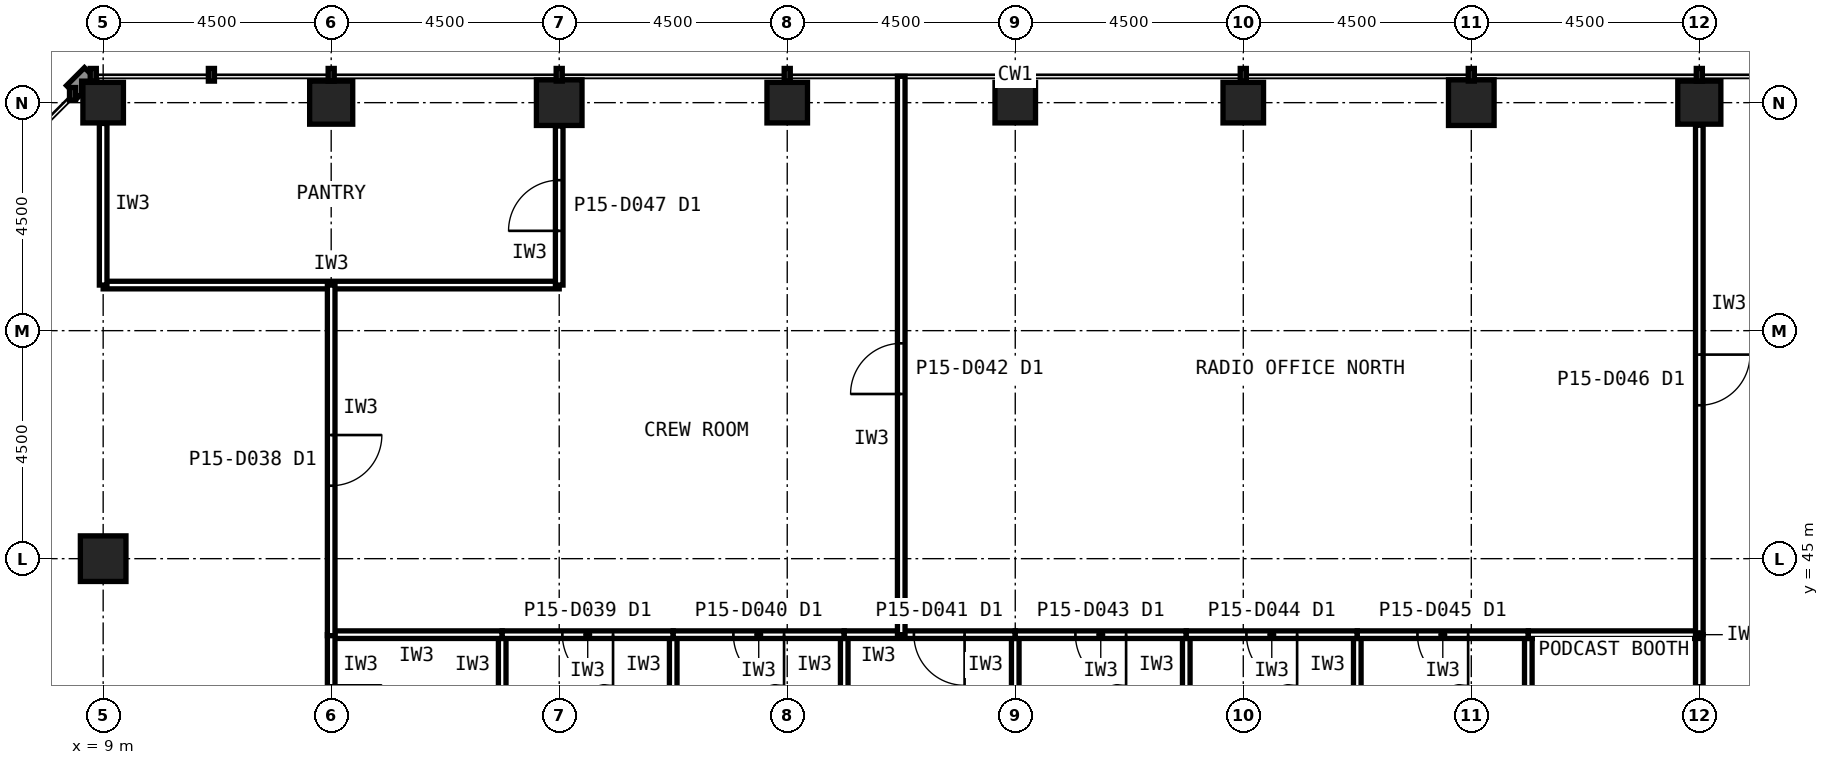
"""IFC4 building model, lengths in metres.
Left out: names, types, materials, properties, quantities, classifications, styles, units other than length and angle.
Written with IfcOpenShell. Run it as: python <this file> out.ifc"""

import sys

from ifc_helpers import new_model, si_unit, direction, frame, frame_2d, origin, origin_2d, place, context, subcontext, project, spatial, rectangle, hollow_rectangle, extrude, element, fill, save


model = new_model("IFC4")
c1 = context("Model", 3, precision=1e-05, world=origin(), true_north=direction((0.0, 1.0)))
c2 = subcontext(c1, "Body", "Model", "MODEL_VIEW")
j1 = project(units=[si_unit("LENGTHUNIT", "METRE"), si_unit("PLANEANGLEUNIT", "RADIAN")], contexts=[c1])
p1 = place(None, origin())
s1 = spatial("IfcSite", under=j1, at=p1, CompositionType="ELEMENT")
p2 = place(p1, origin())
s2 = spatial("IfcBuilding", under=s1, at=p2, CompositionType="ELEMENT")
p3 = place(p2, frame((0.0, 0.0, 62.6)))
s3 = spatial("IfcBuildingStorey", under=s2, at=p3, CompositionType="ELEMENT", Elevation=62.6)
p4 = place(p3, frame((40.5, 54.0, 0.0), z_axis=(0.0, 0.0, 1.0), x_axis=(1.0, 0.0, 0.0)))
e1 = element("IfcColumn", 1, at=p4, inside=s3, PredefinedType="COLUMN", context=c2, shape_type="SweptSolid", body=[
    extrude(hollow_rectangle(XDim=0.85, YDim=0.85, WallThickness=0.05, at=origin_2d()), origin(), (0.0, 0.0, 1.0), 4.2),
])
p5 = place(p3, frame((36.0, 54.0, 0.0), z_axis=(0.0, 0.0, 1.0), x_axis=(1.0, 0.0, 0.0)))
e2 = element("IfcColumn", 2, at=p5, inside=s3, PredefinedType="COLUMN", context=c2, shape_type="SweptSolid", body=[
    extrude(hollow_rectangle(XDim=0.9, YDim=0.9, WallThickness=0.063, at=origin_2d()), origin(), (0.0, 0.0, 1.0), 4.2),
])
for number, where, z_axis, x_axis in (
    (3, (31.5, 54.0, 0.0), (0.0, 0.0, 1.0), (1.0, 0.0, 0.0)),
    (4, (27.0, 54.0, 0.0), (0.0, 0.0, 1.0), (1.0, 0.0, 0.0)),
    (5, (22.5, 54.0, 0.0), (0.0, 0.0, 1.0), (1.0, 0.0, 0.0)),
):
    element("IfcColumn", number, at=place(p3, frame(where, z_axis=z_axis, x_axis=x_axis)), inside=s3, PredefinedType="COLUMN", context=c2, shape_type="SweptSolid", body=[
        extrude(hollow_rectangle(XDim=0.8, YDim=0.8, WallThickness=0.045, at=origin_2d()), origin(), (0.0, 0.0, 1.0), 4.2),
    ])
p6 = place(p3, frame((18.0, 54.0, 0.0), z_axis=(0.0, 0.0, 1.0), x_axis=(1.0, 0.0, 0.0)))
e6 = element("IfcColumn", 6, at=p6, inside=s3, PredefinedType="COLUMN", context=c2, shape_type="SweptSolid", body=[
    extrude(hollow_rectangle(XDim=0.9, YDim=0.9, WallThickness=0.063, at=origin_2d()), origin(), (0.0, 0.0, 1.0), 4.2),
])
p7 = place(p3, frame((13.5, 54.0, 0.0), z_axis=(0.0, 0.0, 1.0), x_axis=(1.0, 0.0, 0.0)))
e7 = element("IfcColumn", 7, at=p7, inside=s3, PredefinedType="COLUMN", context=c2, shape_type="SweptSolid", body=[
    extrude(hollow_rectangle(XDim=0.85, YDim=0.85, WallThickness=0.05, at=origin_2d()), origin(), (0.0, 0.0, 1.0), 4.2),
])
p8 = place(p3, frame((9.0, 54.0, 0.0), z_axis=(0.0, 0.0, 1.0), x_axis=(1.0, 0.0, 0.0)))
e8 = element("IfcColumn", 8, at=p8, inside=s3, PredefinedType="COLUMN", context=c2, shape_type="SweptSolid", body=[
    extrude(hollow_rectangle(XDim=0.8, YDim=0.8, WallThickness=0.045, at=origin_2d()), origin(), (0.0, 0.0, 1.0), 4.2),
])
p9 = place(p3, frame((9.0, 45.0, 0.0), z_axis=(0.0, 0.0, 1.0), x_axis=(1.0, 0.0, 0.0)))
e9 = element("IfcColumn", 9, at=p9, inside=s3, PredefinedType="COLUMN", context=c2, shape_type="SweptSolid", body=[
    extrude(hollow_rectangle(XDim=0.9, YDim=0.9, WallThickness=0.063, at=origin_2d()), origin(), (0.0, 0.0, 1.0), 4.2),
])
p10 = place(p3, frame((16.875, 40.5, 0.0), z_axis=(0.0, 0.0, 1.0), x_axis=(0.0, 1.0, 0.0)))
e10 = element("IfcWall", 10, at=p10, inside=s3, PredefinedType="PARTITIONING", context=c2, shape_type="SweptSolid", body=[
    extrude(rectangle(XDim=3.0, YDim=0.15, at=frame_2d((1.5, 0.0))), origin(), (0.0, 0.0, 1.0), 4.04),
])
p11 = place(p3, frame((16.875, 43.5, 0.0), z_axis=(0.0, 0.0, 1.0), x_axis=(-1.0, 0.0, 0.0)))
e11 = element("IfcWall", 11, at=p11, inside=s3, PredefinedType="PARTITIONING", context=c2, shape_type="SweptSolid", body=[
    extrude(rectangle(XDim=3.375, YDim=0.15, at=frame_2d((1.688, 0.0))), origin(), (0.0, 0.0, 1.0), 4.04),
])
p12 = place(p3, frame((13.5, 43.5, 0.0), z_axis=(0.0, 0.0, 1.0), x_axis=(0.0, -1.0, 0.0)))
e12 = element("IfcWall", 12, at=p12, inside=s3, PredefinedType="PARTITIONING", context=c2, shape_type="SweptSolid", body=[
    extrude(rectangle(XDim=3.0, YDim=0.15, at=frame_2d((1.5, 0.0))), origin(), (0.0, 0.0, 1.0), 3.189),
])
p13 = place(p12, frame((1.0, 0.0, 0.0)))
e13 = element("IfcOpeningElement", 13, at=p13, cuts=e12, PredefinedType="OPENING", context=c2, shape_type="SweptSolid", body=[
    extrude(rectangle(XDim=1.0, YDim=2.1, at=frame_2d((0.5, 1.05))), frame((0.0, 0.085, 0.0), z_axis=(0.0, -1.0, 0.0), x_axis=(1.0, 0.0, 0.0)), (0.0, 0.0, 1.0), 0.17),
])
p14 = place(p3, frame((20.25, 40.5, 0.0), z_axis=(0.0, 0.0, 1.0), x_axis=(0.0, 1.0, 0.0)))
e14 = element("IfcWall", 14, at=p14, inside=s3, PredefinedType="PARTITIONING", context=c2, shape_type="SweptSolid", body=[
    extrude(rectangle(XDim=3.0, YDim=0.15, at=frame_2d((1.5, 0.0))), origin(), (0.0, 0.0, 1.0), 4.04),
])
p15 = place(p3, frame((20.25, 43.5, 0.0), z_axis=(0.0, 0.0, 1.0), x_axis=(-1.0, 0.0, 0.0)))
e15 = element("IfcWall", 15, at=p15, inside=s3, PredefinedType="PARTITIONING", context=c2, shape_type="SweptSolid", body=[
    extrude(rectangle(XDim=3.375, YDim=0.15, at=frame_2d((1.688, 0.0))), origin(), (0.0, 0.0, 1.0), 4.04),
])
p16 = place(p15, frame((1.188, 0.0, 0.0)))
e16 = element("IfcOpeningElement", 16, at=p16, cuts=e15, PredefinedType="OPENING", context=c2, shape_type="SweptSolid", body=[
    extrude(rectangle(XDim=1.0, YDim=2.1, at=frame_2d((0.5, 1.05))), frame((0.0, 0.085, 0.0), z_axis=(0.0, -1.0, 0.0), x_axis=(1.0, 0.0, 0.0)), (0.0, 0.0, 1.0), 0.17),
])
p17 = place(p3, frame((23.625, 40.5, 0.0), z_axis=(0.0, 0.0, 1.0), x_axis=(0.0, 1.0, 0.0)))
e17 = element("IfcWall", 17, at=p17, inside=s3, PredefinedType="PARTITIONING", context=c2, shape_type="SweptSolid", body=[
    extrude(rectangle(XDim=3.0, YDim=0.15, at=frame_2d((1.5, 0.0))), origin(), (0.0, 0.0, 1.0), 4.04),
])
p18 = place(p3, frame((23.625, 43.5, 0.0), z_axis=(0.0, 0.0, 1.0), x_axis=(-1.0, 0.0, 0.0)))
e18 = element("IfcWall", 18, at=p18, inside=s3, PredefinedType="PARTITIONING", context=c2, shape_type="SweptSolid", body=[
    extrude(rectangle(XDim=3.375, YDim=0.15, at=frame_2d((1.688, 0.0))), origin(), (0.0, 0.0, 1.0), 4.04),
])
p19 = place(p18, frame((1.188, 0.0, 0.0)))
e19 = element("IfcOpeningElement", 19, at=p19, cuts=e18, PredefinedType="OPENING", context=c2, shape_type="SweptSolid", body=[
    extrude(rectangle(XDim=1.0, YDim=2.1, at=frame_2d((0.5, 1.05))), frame((0.0, 0.085, 0.0), z_axis=(0.0, -1.0, 0.0), x_axis=(1.0, 0.0, 0.0)), (0.0, 0.0, 1.0), 0.17),
])
p20 = place(p3, frame((27.0, 40.5, 0.0), z_axis=(0.0, 0.0, 1.0), x_axis=(0.0, 1.0, 0.0)))
e20 = element("IfcWall", 20, at=p20, inside=s3, PredefinedType="PARTITIONING", context=c2, shape_type="SweptSolid", body=[
    extrude(rectangle(XDim=3.0, YDim=0.15, at=frame_2d((1.5, 0.0))), origin(), (0.0, 0.0, 1.0), 3.189),
])
p21 = place(p3, frame((27.0, 43.5, 0.0), z_axis=(0.0, 0.0, 1.0), x_axis=(-1.0, 0.0, 0.0)))
e21 = element("IfcWall", 21, at=p21, inside=s3, PredefinedType="PARTITIONING", context=c2, shape_type="SweptSolid", body=[
    extrude(rectangle(XDim=3.375, YDim=0.15, at=frame_2d((1.688, 0.0))), origin(), (0.0, 0.0, 1.0), 4.04),
])
p22 = place(p21, frame((1.0, 0.0, 0.0)))
e22 = element("IfcOpeningElement", 22, at=p22, cuts=e21, PredefinedType="OPENING", context=c2, shape_type="SweptSolid", body=[
    extrude(rectangle(XDim=1.0, YDim=2.1, at=frame_2d((0.5, 1.05))), frame((0.0, 0.085, 0.0), z_axis=(0.0, -1.0, 0.0), x_axis=(1.0, 0.0, 0.0)), (0.0, 0.0, 1.0), 0.17),
])
p23 = place(p3, frame((30.375, 40.5, 0.0), z_axis=(0.0, 0.0, 1.0), x_axis=(0.0, 1.0, 0.0)))
e23 = element("IfcWall", 23, at=p23, inside=s3, PredefinedType="PARTITIONING", context=c2, shape_type="SweptSolid", body=[
    extrude(rectangle(XDim=3.0, YDim=0.15, at=frame_2d((1.5, 0.0))), origin(), (0.0, 0.0, 1.0), 4.04),
])
p24 = place(p3, frame((30.375, 43.5, 0.0), z_axis=(0.0, 0.0, 1.0), x_axis=(-1.0, 0.0, 0.0)))
e24 = element("IfcWall", 24, at=p24, inside=s3, PredefinedType="PARTITIONING", context=c2, shape_type="SweptSolid", body=[
    extrude(rectangle(XDim=3.375, YDim=0.15, at=frame_2d((1.688, 0.0))), origin(), (0.0, 0.0, 1.0), 4.04),
])
p25 = place(p24, frame((1.188, 0.0, 0.0)))
e25 = element("IfcOpeningElement", 25, at=p25, cuts=e24, PredefinedType="OPENING", context=c2, shape_type="SweptSolid", body=[
    extrude(rectangle(XDim=1.0, YDim=2.1, at=frame_2d((0.5, 1.05))), frame((0.0, 0.085, 0.0), z_axis=(0.0, -1.0, 0.0), x_axis=(1.0, 0.0, 0.0)), (0.0, 0.0, 1.0), 0.17),
])
p26 = place(p3, frame((33.75, 40.5, 0.0), z_axis=(0.0, 0.0, 1.0), x_axis=(0.0, 1.0, 0.0)))
e26 = element("IfcWall", 26, at=p26, inside=s3, PredefinedType="PARTITIONING", context=c2, shape_type="SweptSolid", body=[
    extrude(rectangle(XDim=3.0, YDim=0.15, at=frame_2d((1.5, 0.0))), origin(), (0.0, 0.0, 1.0), 4.04),
])
p27 = place(p3, frame((33.75, 43.5, 0.0), z_axis=(0.0, 0.0, 1.0), x_axis=(-1.0, 0.0, 0.0)))
e27 = element("IfcWall", 27, at=p27, inside=s3, PredefinedType="PARTITIONING", context=c2, shape_type="SweptSolid", body=[
    extrude(rectangle(XDim=3.375, YDim=0.15, at=frame_2d((1.688, 0.0))), origin(), (0.0, 0.0, 1.0), 4.04),
])
p28 = place(p27, frame((1.188, 0.0, 0.0)))
e28 = element("IfcOpeningElement", 28, at=p28, cuts=e27, PredefinedType="OPENING", context=c2, shape_type="SweptSolid", body=[
    extrude(rectangle(XDim=1.0, YDim=2.1, at=frame_2d((0.5, 1.05))), frame((0.0, 0.085, 0.0), z_axis=(0.0, -1.0, 0.0), x_axis=(1.0, 0.0, 0.0)), (0.0, 0.0, 1.0), 0.17),
])
p29 = place(p3, frame((37.125, 40.5, 0.0), z_axis=(0.0, 0.0, 1.0), x_axis=(0.0, 1.0, 0.0)))
e29 = element("IfcWall", 29, at=p29, inside=s3, PredefinedType="PARTITIONING", context=c2, shape_type="SweptSolid", body=[
    extrude(rectangle(XDim=3.0, YDim=0.15, at=frame_2d((1.5, 0.0))), origin(), (0.0, 0.0, 1.0), 4.04),
])
p30 = place(p3, frame((37.125, 43.5, 0.0), z_axis=(0.0, 0.0, 1.0), x_axis=(-1.0, 0.0, 0.0)))
e30 = element("IfcWall", 30, at=p30, inside=s3, PredefinedType="PARTITIONING", context=c2, shape_type="SweptSolid", body=[
    extrude(rectangle(XDim=3.375, YDim=0.15, at=frame_2d((1.688, 0.0))), origin(), (0.0, 0.0, 1.0), 4.04),
])
p31 = place(p30, frame((1.188, 0.0, 0.0)))
e31 = element("IfcOpeningElement", 31, at=p31, cuts=e30, PredefinedType="OPENING", context=c2, shape_type="SweptSolid", body=[
    extrude(rectangle(XDim=1.0, YDim=2.1, at=frame_2d((0.5, 1.05))), frame((0.0, 0.085, 0.0), z_axis=(0.0, -1.0, 0.0), x_axis=(1.0, 0.0, 0.0)), (0.0, 0.0, 1.0), 0.17),
])
p32 = place(p3, frame((40.5, 40.5, 0.0), z_axis=(0.0, 0.0, 1.0), x_axis=(0.0, 1.0, 0.0)))
e32 = element("IfcWall", 32, at=p32, inside=s3, PredefinedType="PARTITIONING", context=c2, shape_type="SweptSolid", body=[
    extrude(rectangle(XDim=3.0, YDim=0.15, at=frame_2d((1.5, 0.0))), origin(), (0.0, 0.0, 1.0), 3.189),
])
p33 = place(p32, frame((1.0, 0.0, 0.0)))
e33 = element("IfcOpeningElement", 33, at=p33, cuts=e32, PredefinedType="OPENING", context=c2, shape_type="SweptSolid", body=[
    extrude(rectangle(XDim=1.0, YDim=2.1, at=frame_2d((0.5, 1.05))), frame((0.0, 0.085, 0.0), z_axis=(0.0, -1.0, 0.0), x_axis=(1.0, 0.0, 0.0)), (0.0, 0.0, 1.0), 0.17),
])
p34 = place(p3, frame((40.5, 43.5, 0.0), z_axis=(0.0, 0.0, 1.0), x_axis=(-1.0, 0.0, 0.0)))
e34 = element("IfcWall", 34, at=p34, inside=s3, PredefinedType="PARTITIONING", context=c2, shape_type="SweptSolid", body=[
    extrude(rectangle(XDim=3.375, YDim=0.15, at=frame_2d((1.688, 0.0))), origin(), (0.0, 0.0, 1.0), 4.04),
])
p35 = place(p3, frame((9.0, 50.4, 0.0), z_axis=(0.0, 0.0, 1.0), x_axis=(1.0, 0.0, 0.0)))
e35 = element("IfcWall", 35, at=p35, inside=s3, PredefinedType="PARTITIONING", context=c2, shape_type="SweptSolid", body=[
    extrude(rectangle(XDim=9.0, YDim=0.15, at=frame_2d((4.5, 0.0))), origin(), (0.0, 0.0, 1.0), 4.04),
])
p36 = place(p3, frame((18.0, 50.4, 0.0), z_axis=(0.0, 0.0, 1.0), x_axis=(0.0, 1.0, 0.0)))
e36 = element("IfcWall", 36, at=p36, inside=s3, PredefinedType="PARTITIONING", context=c2, shape_type="SweptSolid", body=[
    extrude(rectangle(XDim=3.14, YDim=0.15, at=frame_2d((1.57, 0.0))), origin(), (0.0, 0.0, 1.0), 3.189),
])
p37 = place(p36, frame((1.07, 0.0, 0.0)))
e37 = element("IfcOpeningElement", 37, at=p37, cuts=e36, PredefinedType="OPENING", context=c2, shape_type="SweptSolid", body=[
    extrude(rectangle(XDim=1.0, YDim=2.1, at=frame_2d((0.5, 1.05))), frame((0.0, 0.085, 0.0), z_axis=(0.0, -1.0, 0.0), x_axis=(1.0, 0.0, 0.0)), (0.0, 0.0, 1.0), 0.17),
])
p38 = place(p3, frame((9.0, 53.59, 0.0), z_axis=(0.0, 0.0, 1.0), x_axis=(0.0, -1.0, 0.0)))
e38 = element("IfcWall", 38, at=p38, inside=s3, PredefinedType="PARTITIONING", context=c2, shape_type="SweptSolid", body=[
    extrude(rectangle(XDim=3.19, YDim=0.15, at=frame_2d((1.595, 0.0))), origin(), (0.0, 0.0, 1.0), 3.429),
])
p39 = place(p3, frame((40.5, 53.555, 0.0), z_axis=(0.0, 0.0, 1.0), x_axis=(0.0, -1.0, 0.0)))
e39 = element("IfcWall", 39, at=p39, inside=s3, PredefinedType="PARTITIONING", context=c2, shape_type="SweptSolid", body=[
    extrude(rectangle(XDim=10.055, YDim=0.15, at=frame_2d((5.027, 0.0))), origin(), (0.0, 0.0, 1.0), 3.189),
])
p40 = place(p39, frame((4.528, 0.0, 0.0)))
e40 = element("IfcOpeningElement", 40, at=p40, cuts=e39, PredefinedType="OPENING", context=c2, shape_type="SweptSolid", body=[
    extrude(rectangle(XDim=1.0, YDim=2.1, at=frame_2d((0.5, 1.05))), frame((0.0, 0.085, 0.0), z_axis=(0.0, -1.0, 0.0), x_axis=(1.0, 0.0, 0.0)), (0.0, 0.0, 1.0), 0.17),
])
p41 = place(p3, frame((24.75, 43.5, 0.0), z_axis=(0.0, 0.0, 1.0), x_axis=(0.0, 1.0, 0.0)))
e41 = element("IfcWall", 41, at=p41, inside=s3, PredefinedType="PARTITIONING", context=c2, shape_type="SweptSolid", body=[
    extrude(rectangle(XDim=11.02, YDim=0.15, at=frame_2d((5.51, 0.0))), origin(), (0.0, 0.0, 1.0), 4.04),
])
p42 = place(p41, frame((4.75, 0.0, 0.0)))
e42 = element("IfcOpeningElement", 42, at=p42, cuts=e41, PredefinedType="OPENING", context=c2, shape_type="SweptSolid", body=[
    extrude(rectangle(XDim=1.0, YDim=2.1, at=frame_2d((0.5, 1.05))), frame((0.0, 0.085, 0.0), z_axis=(0.0, -1.0, 0.0), x_axis=(1.0, 0.0, 0.0)), (0.0, 0.0, 1.0), 0.17),
])
p43 = place(p3, frame((13.5, 50.4, 0.0), z_axis=(0.0, 0.0, 1.0), x_axis=(0.0, -1.0, 0.0)))
e43 = element("IfcWall", 43, at=p43, inside=s3, PredefinedType="PARTITIONING", context=c2, shape_type="SweptSolid", body=[
    extrude(rectangle(XDim=6.92, YDim=0.15, at=frame_2d((3.46, 0.0))), origin(), (0.0, 0.0, 1.0), 3.189),
])
p44 = place(p43, frame((2.96, 0.0, 0.0)))
e44 = element("IfcOpeningElement", 44, at=p44, cuts=e43, PredefinedType="OPENING", context=c2, shape_type="SweptSolid", body=[
    extrude(rectangle(XDim=1.0, YDim=2.1, at=frame_2d((0.5, 1.05))), frame((0.0, 0.085, 0.0), z_axis=(0.0, -1.0, 0.0), x_axis=(1.0, 0.0, 0.0)), (0.0, 0.0, 1.0), 0.17),
])
p45 = place(p16, origin())
e45 = element("IfcDoor", 45, at=p45, inside=s3, OperationType="SINGLE_SWING_LEFT", PredefinedType="DOOR", context=c2, shape_type="SweptSolid", body=[
    extrude(rectangle(XDim=1.0, YDim=2.1, at=frame_2d((0.5, 1.05))), frame((0.0, 0.025, 0.0), z_axis=(0.0, -1.0, 0.0), x_axis=(1.0, 0.0, 0.0)), (0.0, 0.0, 1.0), 0.05),
])
fill(e16, e45)
p46 = place(p19, origin())
e46 = element("IfcDoor", 46, at=p46, inside=s3, OperationType="SINGLE_SWING_LEFT", PredefinedType="DOOR", context=c2, shape_type="SweptSolid", body=[
    extrude(rectangle(XDim=1.0, YDim=2.1, at=frame_2d((0.5, 1.05))), frame((0.0, 0.025, 0.0), z_axis=(0.0, -1.0, 0.0), x_axis=(1.0, 0.0, 0.0)), (0.0, 0.0, 1.0), 0.05),
])
fill(e19, e46)
p47 = place(p22, origin())
e47 = element("IfcDoor", 47, at=p47, inside=s3, OperationType="SINGLE_SWING_LEFT", PredefinedType="DOOR", context=c2, shape_type="SweptSolid", body=[
    extrude(rectangle(XDim=1.0, YDim=2.1, at=frame_2d((0.5, 1.05))), frame((0.0, 0.025, 0.0), z_axis=(0.0, -1.0, 0.0), x_axis=(1.0, 0.0, 0.0)), (0.0, 0.0, 1.0), 0.05),
])
fill(e22, e47)
p48 = place(p25, origin())
e48 = element("IfcDoor", 48, at=p48, inside=s3, OperationType="SINGLE_SWING_LEFT", PredefinedType="DOOR", context=c2, shape_type="SweptSolid", body=[
    extrude(rectangle(XDim=1.0, YDim=2.1, at=frame_2d((0.5, 1.05))), frame((0.0, 0.025, 0.0), z_axis=(0.0, -1.0, 0.0), x_axis=(1.0, 0.0, 0.0)), (0.0, 0.0, 1.0), 0.05),
])
fill(e25, e48)
p49 = place(p28, origin())
e49 = element("IfcDoor", 49, at=p49, inside=s3, OperationType="SINGLE_SWING_LEFT", PredefinedType="DOOR", context=c2, shape_type="SweptSolid", body=[
    extrude(rectangle(XDim=1.0, YDim=2.1, at=frame_2d((0.5, 1.05))), frame((0.0, 0.025, 0.0), z_axis=(0.0, -1.0, 0.0), x_axis=(1.0, 0.0, 0.0)), (0.0, 0.0, 1.0), 0.05),
])
fill(e28, e49)
p50 = place(p31, origin())
e50 = element("IfcDoor", 50, at=p50, inside=s3, OperationType="SINGLE_SWING_LEFT", PredefinedType="DOOR", context=c2, shape_type="SweptSolid", body=[
    extrude(rectangle(XDim=1.0, YDim=2.1, at=frame_2d((0.5, 1.05))), frame((0.0, 0.025, 0.0), z_axis=(0.0, -1.0, 0.0), x_axis=(1.0, 0.0, 0.0)), (0.0, 0.0, 1.0), 0.05),
])
fill(e31, e50)
p51 = place(p37, origin())
e51 = element("IfcDoor", 51, at=p51, inside=s3, OperationType="SINGLE_SWING_LEFT", PredefinedType="DOOR", context=c2, shape_type="SweptSolid", body=[
    extrude(rectangle(XDim=1.0, YDim=2.1, at=frame_2d((0.5, 1.05))), frame((0.0, 0.025, 0.0), z_axis=(0.0, -1.0, 0.0), x_axis=(1.0, 0.0, 0.0)), (0.0, 0.0, 1.0), 0.05),
])
fill(e37, e51)
p52 = place(p40, origin())
e52 = element("IfcDoor", 52, at=p52, inside=s3, OperationType="SINGLE_SWING_LEFT", PredefinedType="DOOR", context=c2, shape_type="SweptSolid", body=[
    extrude(rectangle(XDim=1.0, YDim=2.1, at=frame_2d((0.5, 1.05))), frame((0.0, 0.025, 0.0), z_axis=(0.0, -1.0, 0.0), x_axis=(1.0, 0.0, 0.0)), (0.0, 0.0, 1.0), 0.05),
])
fill(e40, e52)
p53 = place(p42, origin())
e53 = element("IfcDoor", 53, at=p53, inside=s3, OperationType="SINGLE_SWING_LEFT", PredefinedType="DOOR", context=c2, shape_type="SweptSolid", body=[
    extrude(rectangle(XDim=1.0, YDim=2.1, at=frame_2d((0.5, 1.05))), frame((0.0, 0.025, 0.0), z_axis=(0.0, -1.0, 0.0), x_axis=(1.0, 0.0, 0.0)), (0.0, 0.0, 1.0), 0.05),
])
fill(e42, e53)
p54 = place(p44, origin())
e54 = element("IfcDoor", 54, at=p54, inside=s3, OperationType="SINGLE_SWING_LEFT", PredefinedType="DOOR", context=c2, shape_type="SweptSolid", body=[
    extrude(rectangle(XDim=1.0, YDim=2.1, at=frame_2d((0.5, 1.05))), frame((0.0, 0.025, 0.0), z_axis=(0.0, -1.0, 0.0), x_axis=(1.0, 0.0, 0.0)), (0.0, 0.0, 1.0), 0.05),
])
fill(e44, e54)
save(model, sys.argv[1])
